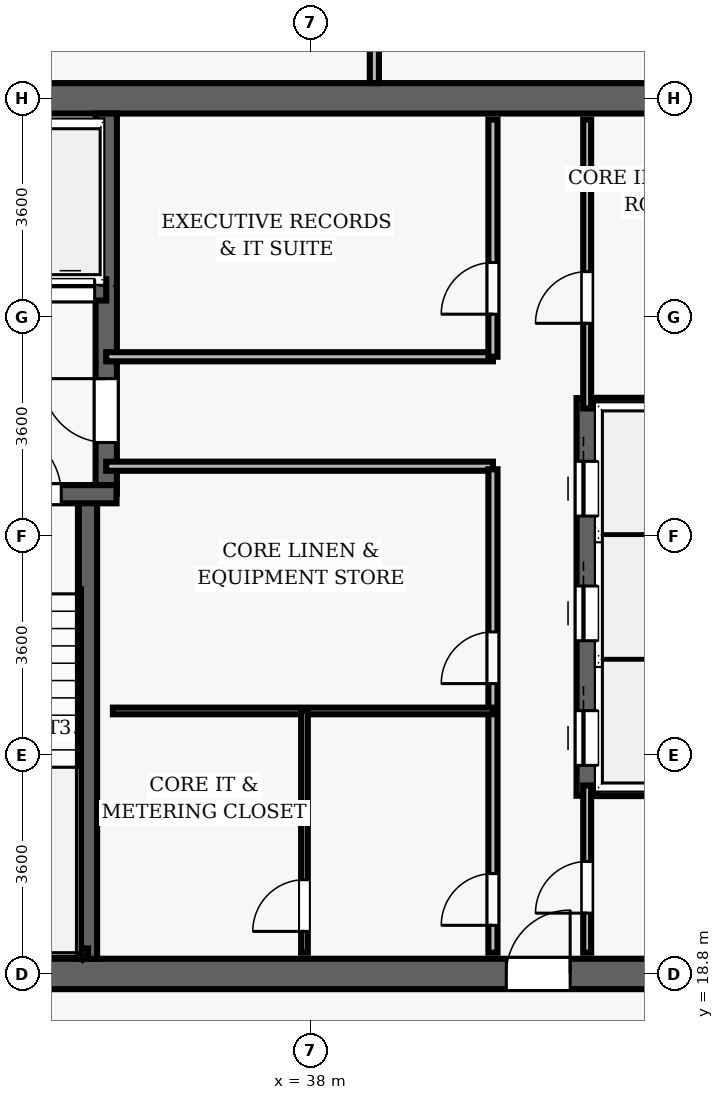
"""IFC4 building model, lengths in metres.
Left out: names, types, materials, properties, quantities, classifications, styles, units other than length and angle.
Written with IfcOpenShell. Run it as: python <this file> out.ifc"""

import sys

from ifc_helpers import new_model, si_unit, direction, frame, frame_2d, origin, place, context, subcontext, project, spatial, rectangle, extrude, element, fill, save


model = new_model("IFC4")
c1 = context("Model", 3, precision=1e-05, world=origin(), true_north=direction((0.0, 1.0)))
c2 = subcontext(c1, "Body", "Model", "MODEL_VIEW")
j1 = project(units=[si_unit("LENGTHUNIT", "METRE"), si_unit("PLANEANGLEUNIT", "RADIAN")], contexts=[c1])
p1 = place(None, origin())
s1 = spatial("IfcSite", under=j1, at=p1, CompositionType="ELEMENT")
p2 = place(p1, origin())
s2 = spatial("IfcBuilding", under=s1, at=p2, CompositionType="ELEMENT")
p3 = place(p2, frame((0.0, 0.0, 288.25)))
s3 = spatial("IfcBuildingStorey", under=s2, at=p3, CompositionType="ELEMENT", Elevation=288.25)
p4 = place(p3, frame((26.75, 18.8, 0.0), z_axis=(0.0, 0.0, 1.0), x_axis=(1.0, 0.0, 0.0)))
e1 = element("IfcWall", 1, at=p4, inside=s3, PredefinedType="SHEAR", context=c2, shape_type="SweptSolid", body=[
    extrude(rectangle(XDim=22.5, YDim=0.5, at=frame_2d((11.25, 0.0))), origin(), (0.0, 0.0, 1.0), 3.85),
])
p5 = place(p4, frame((14.47, 0.0, 0.0)))
e2 = element("IfcOpeningElement", 2, at=p5, cuts=e1, PredefinedType="OPENING", context=c2, shape_type="SweptSolid", body=[
    extrude(rectangle(XDim=1.05, YDim=2.15, at=frame_2d((0.525, 1.075))), frame((0.0, 0.26, 0.0), z_axis=(0.0, -1.0, 0.0), x_axis=(1.0, 0.0, 0.0)), (0.0, 0.0, 1.0), 0.52),
])
p6 = place(p3, frame((26.75, 33.2, 0.0), z_axis=(0.0, 0.0, 1.0), x_axis=(1.0, 0.0, 0.0)))
e3 = element("IfcWall", 3, at=p6, inside=s3, PredefinedType="SHEAR", context=c2, shape_type="SweptSolid", body=[
    extrude(rectangle(XDim=22.5, YDim=0.5, at=frame_2d((11.25, 0.0))), origin(), (0.0, 0.0, 1.0), 3.85),
])
p7 = place(p3, frame((34.34, 19.05, 0.0), z_axis=(0.0, 0.0, 1.0), x_axis=(0.0, 1.0, 0.0)))
e4 = element("IfcWall", 4, at=p7, inside=s3, PredefinedType="SHEAR", context=c2, shape_type="SweptSolid", body=[
    extrude(rectangle(XDim=7.5, YDim=0.3, at=frame_2d((3.75, 0.0))), origin(), (0.0, 0.0, 1.0), 3.85),
])
p8 = place(p3, frame((34.64, 26.69, 0.0), z_axis=(0.0, 0.0, 1.0), x_axis=(0.0, 1.0, 0.0)))
e5 = element("IfcWall", 5, at=p8, inside=s3, PredefinedType="SHEAR", context=c2, shape_type="SweptSolid", body=[
    extrude(rectangle(XDim=6.26, YDim=0.35, at=frame_2d((3.13, 0.0))), origin(), (0.0, 0.0, 1.0), 3.85),
])
p9 = place(p8, frame((0.85, 0.0, 0.0)))
e6 = element("IfcOpeningElement", 6, at=p9, cuts=e5, PredefinedType="OPENING", context=c2, shape_type="SweptSolid", body=[
    extrude(rectangle(XDim=1.05, YDim=2.15, at=frame_2d((0.525, 1.075))), frame((0.0, 0.185, 0.0), z_axis=(0.0, -1.0, 0.0), x_axis=(1.0, 0.0, 0.0)), (0.0, 0.0, 1.0), 0.37),
])
p10 = place(p3, frame((31.25, 26.69, 0.0), z_axis=(0.0, 0.0, 1.0), x_axis=(1.0, 0.0, 0.0)))
e7 = element("IfcWall", 7, at=p10, inside=s3, PredefinedType="SHEAR", context=c2, shape_type="SweptSolid", body=[
    extrude(rectangle(XDim=3.56, YDim=0.3, at=frame_2d((1.78, 0.0))), origin(), (0.0, 0.0, 1.0), 3.85),
])
p11 = place(p10, frame((1.55, 0.0, 0.0)))
e8 = element("IfcOpeningElement", 8, at=p11, cuts=e7, PredefinedType="OPENING", context=c2, shape_type="SweptSolid", body=[
    extrude(rectangle(XDim=1.1, YDim=2.15, at=frame_2d((0.55, 1.075))), frame((0.0, 0.16, 0.0), z_axis=(0.0, -1.0, 0.0), x_axis=(1.0, 0.0, 0.0)), (0.0, 0.0, 1.0), 0.32),
])
p12 = place(p3, frame((31.3, 19.16, 0.0), z_axis=(0.0, 0.0, 1.0), x_axis=(1.0, 0.0, 0.0)))
e9 = element("IfcWall", 9, at=p12, inside=s3, PredefinedType="SHEAR", context=c2, shape_type="SweptSolid", body=[
    extrude(rectangle(XDim=3.04, YDim=0.12, at=frame_2d((1.52, 0.0))), origin(), (0.0, 0.0, 1.0), 3.85),
])
p13 = place(p3, frame((32.23, 30.05, 0.0), z_axis=(0.0, 0.0, 1.0), x_axis=(1.0, 0.0, 0.0)))
e10 = element("IfcWall", 10, at=p13, inside=s3, PredefinedType="SHEAR", context=c2, shape_type="SweptSolid", body=[
    extrude(rectangle(XDim=2.41, YDim=0.35, at=frame_2d((1.205, 0.0))), origin(), (0.0, 0.0, 1.0), 3.04),
])
p14 = place(p13, frame((0.42, 0.0, 0.0)))
e11 = element("IfcOpeningElement", 11, at=p14, cuts=e10, PredefinedType="OPENING", context=c2, shape_type="SweptSolid", body=[
    extrude(rectangle(XDim=0.8, YDim=2.15, at=frame_2d((0.4, 1.075))), frame((0.0, 0.185, 0.0), z_axis=(0.0, -1.0, 0.0), x_axis=(1.0, 0.0, 0.0)), (0.0, 0.0, 1.0), 0.37),
])
p15 = place(p13, frame((1.42, 0.0, 0.0)))
e12 = element("IfcOpeningElement", 12, at=p15, cuts=e10, PredefinedType="OPENING", context=c2, shape_type="SweptSolid", body=[
    extrude(rectangle(XDim=0.8, YDim=2.15, at=frame_2d((0.4, 1.075))), frame((0.0, 0.185, 0.0), z_axis=(0.0, -1.0, 0.0), x_axis=(1.0, 0.0, 0.0)), (0.0, 0.0, 1.0), 0.37),
])
p16 = place(p3, frame((42.55, 21.73, 0.0), z_axis=(0.0, 0.0, 1.0), x_axis=(0.0, 1.0, 0.0)))
e13 = element("IfcWall", 13, at=p16, inside=s3, PredefinedType="SHEAR", context=c2, shape_type="SweptSolid", body=[
    extrude(rectangle(XDim=6.54, YDim=0.35, at=frame_2d((3.27, 0.0))), origin(), (0.0, 0.0, 1.0), 3.04),
])
p17 = place(p16, frame((0.5, 0.0, 0.0)))
e14 = element("IfcOpeningElement", 14, at=p17, cuts=e13, PredefinedType="OPENING", context=c2, shape_type="SweptSolid", body=[
    extrude(rectangle(XDim=0.9, YDim=2.15, at=frame_2d((0.45, 1.075))), frame((0.0, 0.185, 0.0), z_axis=(0.0, -1.0, 0.0), x_axis=(1.0, 0.0, 0.0)), (0.0, 0.0, 1.0), 0.37),
])
p18 = place(p16, frame((2.55, 0.0, 0.0)))
e15 = element("IfcOpeningElement", 15, at=p18, cuts=e13, PredefinedType="OPENING", context=c2, shape_type="SweptSolid", body=[
    extrude(rectangle(XDim=0.9, YDim=2.15, at=frame_2d((0.45, 1.075))), frame((0.0, 0.185, 0.0), z_axis=(0.0, -1.0, 0.0), x_axis=(1.0, 0.0, 0.0)), (0.0, 0.0, 1.0), 0.37),
])
p19 = place(p16, frame((4.6, 0.0, 0.0)))
e16 = element("IfcOpeningElement", 16, at=p19, cuts=e13, PredefinedType="OPENING", context=c2, shape_type="SweptSolid", body=[
    extrude(rectangle(XDim=0.9, YDim=2.15, at=frame_2d((0.45, 1.075))), frame((0.0, 0.185, 0.0), z_axis=(0.0, -1.0, 0.0), x_axis=(1.0, 0.0, 0.0)), (0.0, 0.0, 1.0), 0.37),
])
for number, where, z_axis, x_axis in (
    (17, (42.72, 21.9, 0.0), (0.0, 0.0, 1.0), (1.0, 0.0, 0.0)),
    (18, (42.72, 28.1, 0.0), (0.0, 0.0, 1.0), (1.0, 0.0, 0.0)),
):
    element("IfcWall", number, at=place(p3, frame(where, z_axis=z_axis, x_axis=x_axis)), inside=s3, PredefinedType="SHEAR", context=c2, shape_type="SweptSolid", body=[
        extrude(rectangle(XDim=2.03, YDim=0.35, at=frame_2d((1.015, 0.0))), origin(), (0.0, 0.0, 1.0), 3.04),
    ])
for number, where, z_axis, x_axis in (
    (19, (34.64, 27.15, 0.0), (0.0, 0.0, 1.0), (1.0, 0.0, 0.0)),
    (20, (34.64, 28.95, 0.0), (0.0, 0.0, 1.0), (1.0, 0.0, 0.0)),
):
    element("IfcWall", number, at=place(p3, frame(where, z_axis=z_axis, x_axis=x_axis)), inside=s3, PredefinedType="PARTITIONING", context=c2, shape_type="SweptSolid", body=[
        extrude(rectangle(XDim=6.36, YDim=0.15, at=frame_2d((3.18, 0.0))), origin(), (0.0, 0.0, 1.0), 3.04),
    ])
p20 = place(p3, frame((41.0, 28.95, 0.0), z_axis=(0.0, 0.0, 1.0), x_axis=(0.0, 1.0, 0.0)))
e21 = element("IfcWall", 21, at=p20, inside=s3, PredefinedType="PARTITIONING", context=c2, shape_type="SweptSolid", body=[
    extrude(rectangle(XDim=3.9, YDim=0.15, at=frame_2d((1.95, 0.0))), origin(), (0.0, 0.0, 1.0), 3.04),
])
p21 = place(p20, frame((0.7, 0.0, 0.0)))
e22 = element("IfcOpeningElement", 22, at=p21, cuts=e21, PredefinedType="OPENING", context=c2, shape_type="SweptSolid", body=[
    extrude(rectangle(XDim=0.85, YDim=2.1, at=frame_2d((0.425, 1.05))), frame((0.0, 0.085, 0.0), z_axis=(0.0, -1.0, 0.0), x_axis=(1.0, 0.0, 0.0)), (0.0, 0.0, 1.0), 0.17),
])
p22 = place(p3, frame((41.0, 19.15, 0.0), z_axis=(0.0, 0.0, 1.0), x_axis=(0.0, 1.0, 0.0)))
e23 = element("IfcWall", 23, at=p22, inside=s3, PredefinedType="PARTITIONING", context=c2, shape_type="SweptSolid", body=[
    extrude(rectangle(XDim=7.95, YDim=0.15, at=frame_2d((3.975, 0.0))), origin(), (0.0, 0.0, 1.0), 3.04),
])
p23 = place(p22, frame((4.425, 0.0, 0.0)))
e24 = element("IfcOpeningElement", 24, at=p23, cuts=e23, PredefinedType="OPENING", context=c2, shape_type="SweptSolid", body=[
    extrude(rectangle(XDim=0.85, YDim=2.1, at=frame_2d((0.425, 1.05))), frame((0.0, 0.085, 0.0), z_axis=(0.0, -1.0, 0.0), x_axis=(1.0, 0.0, 0.0)), (0.0, 0.0, 1.0), 0.17),
])
p24 = place(p22, frame((0.45, 0.0, 0.0)))
e25 = element("IfcOpeningElement", 25, at=p24, cuts=e23, PredefinedType="OPENING", context=c2, shape_type="SweptSolid", body=[
    extrude(rectangle(XDim=0.85, YDim=2.1, at=frame_2d((0.425, 1.05))), frame((0.0, 0.085, 0.0), z_axis=(0.0, -1.0, 0.0), x_axis=(1.0, 0.0, 0.0)), (0.0, 0.0, 1.0), 0.17),
])
p25 = place(p3, frame((34.75, 23.125, 0.0), z_axis=(0.0, 0.0, 1.0), x_axis=(1.0, 0.0, 0.0)))
e26 = element("IfcWall", 26, at=p25, inside=s3, PredefinedType="PARTITIONING", context=c2, shape_type="SweptSolid", body=[
    extrude(rectangle(XDim=6.25, YDim=0.11, at=frame_2d((3.125, 0.0))), origin(), (0.0, 0.0, 1.0), 3.04),
])
p26 = place(p3, frame((37.9, 19.15, 0.0), z_axis=(0.0, 0.0, 1.0), x_axis=(0.0, 1.0, 0.0)))
e27 = element("IfcWall", 27, at=p26, inside=s3, PredefinedType="PARTITIONING", context=c2, shape_type="SweptSolid", body=[
    extrude(rectangle(XDim=3.975, YDim=0.11, at=frame_2d((1.988, 0.0))), origin(), (0.0, 0.0, 1.0), 3.04),
])
p27 = place(p26, frame((0.35, 0.0, 0.0)))
e28 = element("IfcOpeningElement", 28, at=p27, cuts=e27, PredefinedType="OPENING", context=c2, shape_type="SweptSolid", body=[
    extrude(rectangle(XDim=0.85, YDim=2.1, at=frame_2d((0.425, 1.05))), frame((0.0, 0.065, 0.0), z_axis=(0.0, -1.0, 0.0), x_axis=(1.0, 0.0, 0.0)), (0.0, 0.0, 1.0), 0.13),
])
p28 = place(p3, frame((42.55, 28.1, 0.0), z_axis=(0.0, 0.0, 1.0), x_axis=(0.0, 1.0, 0.0)))
e29 = element("IfcWall", 29, at=p28, inside=s3, PredefinedType="PARTITIONING", context=c2, shape_type="SweptSolid", body=[
    extrude(rectangle(XDim=4.75, YDim=0.13, at=frame_2d((2.375, 0.0))), origin(), (0.0, 0.0, 1.0), 3.04),
])
p29 = place(p28, frame((1.4, 0.0, 0.0)))
e30 = element("IfcOpeningElement", 30, at=p29, cuts=e29, PredefinedType="OPENING", context=c2, shape_type="SweptSolid", body=[
    extrude(rectangle(XDim=0.85, YDim=2.1, at=frame_2d((0.425, 1.05))), frame((0.0, 0.075, 0.0), z_axis=(0.0, -1.0, 0.0), x_axis=(1.0, 0.0, 0.0)), (0.0, 0.0, 1.0), 0.15),
])
p30 = place(p3, frame((42.55, 19.15, 0.0), z_axis=(0.0, 0.0, 1.0), x_axis=(0.0, 1.0, 0.0)))
e31 = element("IfcWall", 31, at=p30, inside=s3, PredefinedType="PARTITIONING", context=c2, shape_type="SweptSolid", body=[
    extrude(rectangle(XDim=2.75, YDim=0.13, at=frame_2d((1.375, 0.0))), origin(), (0.0, 0.0, 1.0), 3.04),
])
p31 = place(p30, frame((0.65, 0.0, 0.0)))
e32 = element("IfcOpeningElement", 32, at=p31, cuts=e31, PredefinedType="OPENING", context=c2, shape_type="SweptSolid", body=[
    extrude(rectangle(XDim=0.85, YDim=2.1, at=frame_2d((0.425, 1.05))), frame((0.0, 0.075, 0.0), z_axis=(0.0, -1.0, 0.0), x_axis=(1.0, 0.0, 0.0)), (0.0, 0.0, 1.0), 0.15),
])
p32 = place(p3, frame((39.05, 33.45, 0.0), z_axis=(0.0, 0.0, 1.0), x_axis=(0.0, 1.0, 0.0)))
e33 = element("IfcWall", 33, at=p32, inside=s3, PredefinedType="PARTITIONING", context=c2, shape_type="SweptSolid", body=[
    extrude(rectangle(XDim=6.95, YDim=0.15, at=frame_2d((3.475, 0.0))), origin(), (0.0, 0.0, 1.0), 3.04),
])
p33 = place(p32, frame((0.988, 0.0, 0.0)))
e34 = element("IfcOpeningElement", 34, at=p33, cuts=e33, PredefinedType="OPENING", context=c2, shape_type="SweptSolid", body=[
    extrude(rectangle(XDim=1.5, YDim=2.2, at=frame_2d((0.75, 1.1))), frame((0.0, 0.085, 0.0), z_axis=(0.0, -1.0, 0.0), x_axis=(1.0, 0.0, 0.0)), (0.0, 0.0, 1.0), 0.17),
])
p34 = place(p11, origin())
e35 = element("IfcDoor", 35, at=p34, inside=s3, OperationType="SINGLE_SWING_LEFT", PredefinedType="DOOR", context=c2, shape_type="SweptSolid", body=[
    extrude(rectangle(XDim=1.1, YDim=2.15, at=frame_2d((0.55, 1.075))), frame((0.0, 0.025, 0.0), z_axis=(0.0, -1.0, 0.0), x_axis=(1.0, 0.0, 0.0)), (0.0, 0.0, 1.0), 0.05),
])
fill(e8, e35)
p35 = place(p5, origin())
e36 = element("IfcDoor", 36, at=p35, inside=s3, OperationType="SINGLE_SWING_RIGHT", PredefinedType="DOOR", context=c2, shape_type="SweptSolid", body=[
    extrude(rectangle(XDim=1.05, YDim=2.15, at=frame_2d((0.525, 1.075))), frame((0.0, 0.025, 0.0), z_axis=(0.0, -1.0, 0.0), x_axis=(1.0, 0.0, 0.0)), (0.0, 0.0, 1.0), 0.05),
])
fill(e2, e36)
p36 = place(p9, origin())
e37 = element("IfcDoor", 37, at=p36, inside=s3, OperationType="SINGLE_SWING_RIGHT", PredefinedType="DOOR", context=c2, shape_type="SweptSolid", body=[
    extrude(rectangle(XDim=1.05, YDim=2.15, at=frame_2d((0.525, 1.075))), frame((0.0, 0.025, 0.0), z_axis=(0.0, -1.0, 0.0), x_axis=(1.0, 0.0, 0.0)), (0.0, 0.0, 1.0), 0.05),
])
fill(e6, e37)
p37 = place(p21, origin())
e38 = element("IfcDoor", 38, at=p37, inside=s3, OperationType="SINGLE_SWING_LEFT", PredefinedType="DOOR", context=c2, shape_type="SweptSolid", body=[
    extrude(rectangle(XDim=0.85, YDim=2.1, at=frame_2d((0.425, 1.05))), frame((0.0, 0.025, 0.0), z_axis=(0.0, -1.0, 0.0), x_axis=(1.0, 0.0, 0.0)), (0.0, 0.0, 1.0), 0.05),
])
fill(e22, e38)
p38 = place(p23, origin())
e39 = element("IfcDoor", 39, at=p38, inside=s3, OperationType="SINGLE_SWING_LEFT", PredefinedType="DOOR", context=c2, shape_type="SweptSolid", body=[
    extrude(rectangle(XDim=0.85, YDim=2.1, at=frame_2d((0.425, 1.05))), frame((0.0, 0.025, 0.0), z_axis=(0.0, -1.0, 0.0), x_axis=(1.0, 0.0, 0.0)), (0.0, 0.0, 1.0), 0.05),
])
fill(e24, e39)
p39 = place(p24, origin())
e40 = element("IfcDoor", 40, at=p39, inside=s3, OperationType="SINGLE_SWING_LEFT", PredefinedType="DOOR", context=c2, shape_type="SweptSolid", body=[
    extrude(rectangle(XDim=0.85, YDim=2.1, at=frame_2d((0.425, 1.05))), frame((0.0, 0.025, 0.0), z_axis=(0.0, -1.0, 0.0), x_axis=(1.0, 0.0, 0.0)), (0.0, 0.0, 1.0), 0.05),
])
fill(e25, e40)
p40 = place(p27, origin())
e41 = element("IfcDoor", 41, at=p40, inside=s3, OperationType="SINGLE_SWING_LEFT", PredefinedType="DOOR", context=c2, shape_type="SweptSolid", body=[
    extrude(rectangle(XDim=0.85, YDim=2.1, at=frame_2d((0.425, 1.05))), frame((0.0, 0.025, 0.0), z_axis=(0.0, -1.0, 0.0), x_axis=(1.0, 0.0, 0.0)), (0.0, 0.0, 1.0), 0.05),
])
fill(e28, e41)
p41 = place(p29, origin())
e42 = element("IfcDoor", 42, at=p41, inside=s3, OperationType="SINGLE_SWING_LEFT", PredefinedType="DOOR", context=c2, shape_type="SweptSolid", body=[
    extrude(rectangle(XDim=0.85, YDim=2.1, at=frame_2d((0.425, 1.05))), frame((0.0, 0.025, 0.0), z_axis=(0.0, -1.0, 0.0), x_axis=(1.0, 0.0, 0.0)), (0.0, 0.0, 1.0), 0.05),
])
fill(e30, e42)
p42 = place(p31, origin())
e43 = element("IfcDoor", 43, at=p42, inside=s3, OperationType="SINGLE_SWING_LEFT", PredefinedType="DOOR", context=c2, shape_type="SweptSolid", body=[
    extrude(rectangle(XDim=0.85, YDim=2.1, at=frame_2d((0.425, 1.05))), frame((0.0, 0.025, 0.0), z_axis=(0.0, -1.0, 0.0), x_axis=(1.0, 0.0, 0.0)), (0.0, 0.0, 1.0), 0.05),
])
fill(e32, e43)
p43 = place(p17, origin())
e44 = element("IfcDoor", 44, at=p43, inside=s3, OperationType="SLIDING_TO_LEFT", PredefinedType="DOOR", context=c2, shape_type="SweptSolid", body=[
    extrude(rectangle(XDim=0.9, YDim=2.15, at=frame_2d((0.45, 1.075))), frame((0.0, 0.025, 0.0), z_axis=(0.0, -1.0, 0.0), x_axis=(1.0, 0.0, 0.0)), (0.0, 0.0, 1.0), 0.05),
])
fill(e14, e44)
p44 = place(p18, origin())
e45 = element("IfcDoor", 45, at=p44, inside=s3, OperationType="SLIDING_TO_LEFT", PredefinedType="DOOR", context=c2, shape_type="SweptSolid", body=[
    extrude(rectangle(XDim=0.9, YDim=2.15, at=frame_2d((0.45, 1.075))), frame((0.0, 0.025, 0.0), z_axis=(0.0, -1.0, 0.0), x_axis=(1.0, 0.0, 0.0)), (0.0, 0.0, 1.0), 0.05),
])
fill(e15, e45)
p45 = place(p19, origin())
e46 = element("IfcDoor", 46, at=p45, inside=s3, OperationType="SLIDING_TO_LEFT", PredefinedType="DOOR", context=c2, shape_type="SweptSolid", body=[
    extrude(rectangle(XDim=0.9, YDim=2.15, at=frame_2d((0.45, 1.075))), frame((0.0, 0.025, 0.0), z_axis=(0.0, -1.0, 0.0), x_axis=(1.0, 0.0, 0.0)), (0.0, 0.0, 1.0), 0.05),
])
fill(e16, e46)
p46 = place(p15, origin())
e47 = element("IfcDoor", 47, at=p46, inside=s3, OperationType="SLIDING_TO_LEFT", PredefinedType="DOOR", context=c2, shape_type="SweptSolid", body=[
    extrude(rectangle(XDim=0.8, YDim=2.15, at=frame_2d((0.4, 1.075))), frame((0.0, 0.025, 0.0), z_axis=(0.0, -1.0, 0.0), x_axis=(1.0, 0.0, 0.0)), (0.0, 0.0, 1.0), 0.05),
])
fill(e12, e47)
save(model, sys.argv[1])
